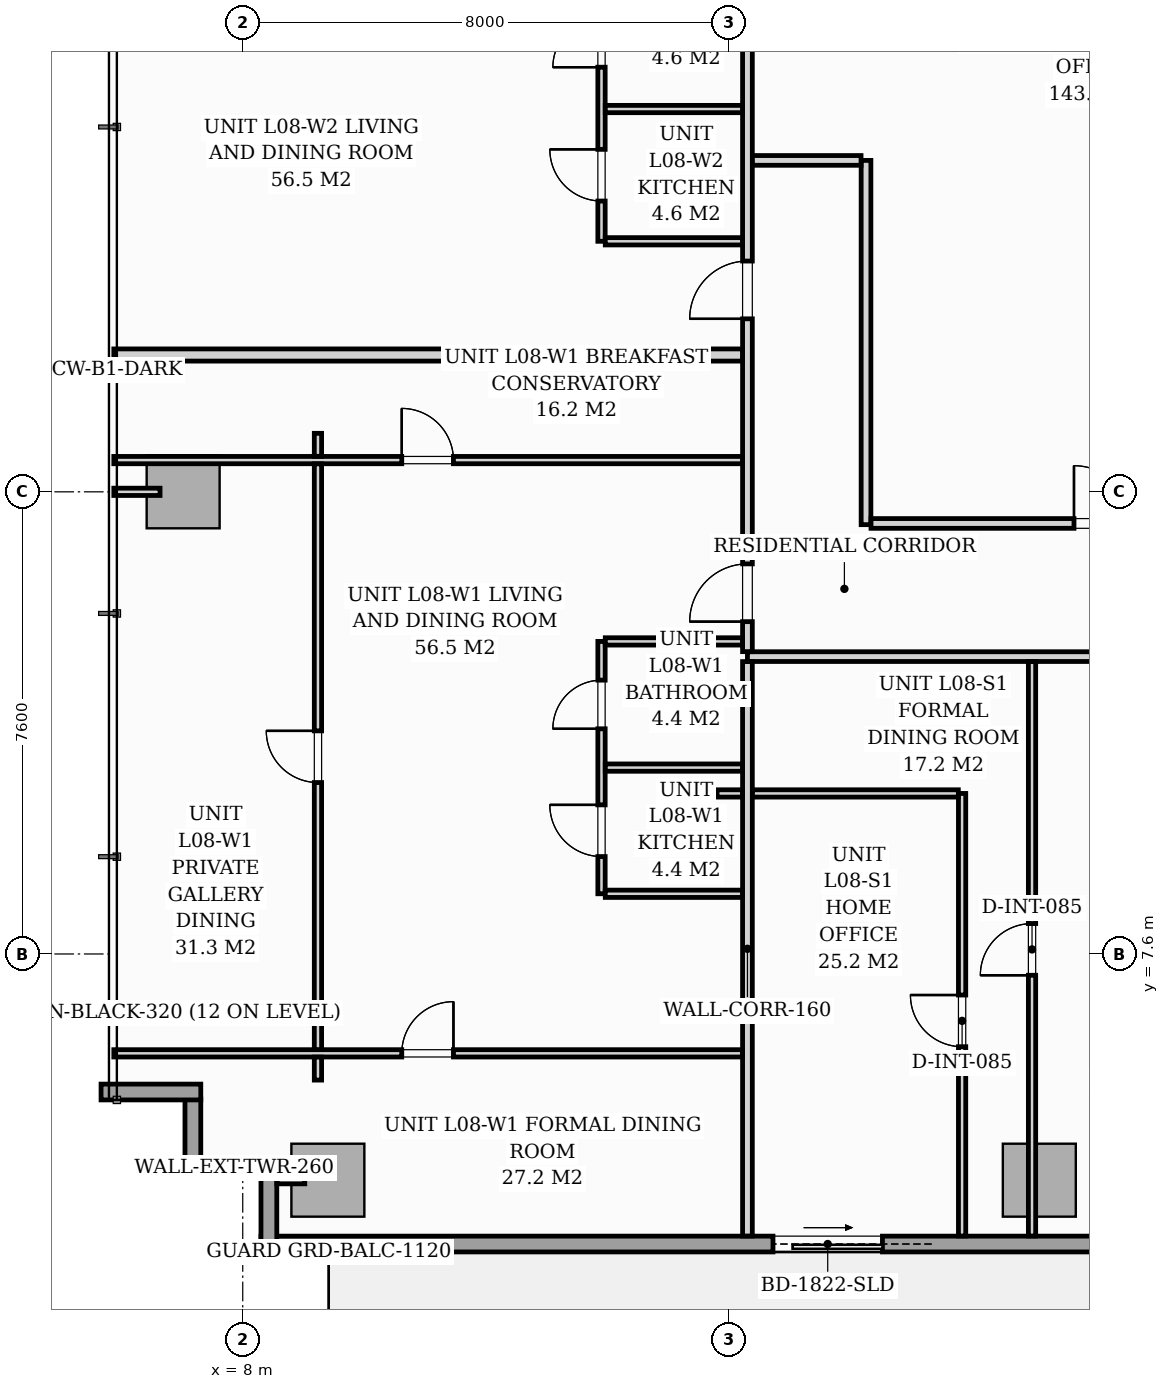
"""IFC4 building model, lengths in metres.
Left out: names, types, materials, properties, quantities, classifications, styles, units other than length and angle.
Written with IfcOpenShell. Run it as: python <this file> out.ifc"""

import sys

from ifc_helpers import new_model, si_unit, direction, frame, frame_2d, origin, origin_2d, place, context, subcontext, project, spatial, rectangle, extrude, source, transform, mapped, element, fill, save


model = new_model("IFC4")
c1 = context("Model", 3, precision=1e-05, world=origin(), true_north=direction((0.0, 1.0)))
c2 = subcontext(c1, "Body", "Model", "MODEL_VIEW")
j1 = project(units=[si_unit("LENGTHUNIT", "METRE"), si_unit("PLANEANGLEUNIT", "RADIAN")], contexts=[c1])
p1 = place(None, origin())
s1 = spatial("IfcSite", under=j1, at=p1, CompositionType="ELEMENT")
p2 = place(p1, origin())
s2 = spatial("IfcBuilding", under=s1, at=p2, CompositionType="ELEMENT")
p3 = place(p2, frame((0.0, 0.0, 32.6)))
s3 = spatial("IfcBuildingStorey", under=s2, at=p3, CompositionType="ELEMENT", Elevation=32.6)
m1 = source(origin(), c2, "Body", "SweptSolid", [
    extrude(rectangle(XDim=1.2, YDim=1.2, at=origin_2d()), origin(), (0.0, 0.0, 1.0), 3.196),
])
for number, where, z_axis, x_axis in (
    (1, (9.4, 3.88, 0.002), (0.0, 0.0, 1.0), (1.0, 0.0, 0.0)),
    (2, (21.1, 3.88, 0.002), (0.0, 0.0, 1.0), (1.0, 0.0, 0.0)),
    (3, (7.02, 15.2, 0.002), (0.0, 0.0, 1.0), (1.0, 0.0, 0.0)),
):
    element("IfcColumn", number, at=place(p3, frame(where, z_axis=z_axis, x_axis=x_axis)), inside=s3, PredefinedType="COLUMN", context=c2, shape_type="MappedRepresentation", body=[
        mapped(m1, transform((0.0, 0.0, 0.0), scale=1.0)),
    ])
p4 = place(p3, frame((8.798, 4.08, 0.0), z_axis=(0.0, 0.0, 1.0), x_axis=(-1.0, 0.0, 0.0)))
e4 = element("IfcWall", 4, at=p4, inside=s3, PredefinedType="STANDARD", context=c2, shape_type="SweptSolid", body=[
    extrude(rectangle(XDim=1.878, YDim=0.26, at=frame_2d((0.939, 0.0))), origin(), (0.0, 0.0, 1.0), 2.94),
])
p5 = place(p3, frame((7.18, 4.065, 0.0), z_axis=(0.0, 0.0, 1.0), x_axis=(0.0, 1.0, 0.0)))
e5 = element("IfcWall", 5, at=p5, inside=s3, PredefinedType="STANDARD", context=c2, shape_type="SweptSolid", body=[
    extrude(rectangle(XDim=1.15, YDim=0.26, at=frame_2d((0.575, 0.0))), origin(), (0.0, 0.0, 1.0), 2.94),
])
p6 = place(p3, frame((7.31, 5.33, 0.0), z_axis=(0.0, 0.0, 1.0), x_axis=(-1.0, 0.0, 0.0)))
e6 = element("IfcWall", 6, at=p6, inside=s3, PredefinedType="STANDARD", context=c2, shape_type="SweptSolid", body=[
    extrude(rectangle(XDim=1.64, YDim=0.26, at=frame_2d((0.82, 0.0))), origin(), (0.0, 0.0, 1.0), 2.94),
])
p7 = place(p3, frame((25.45, 2.83, 0.0), z_axis=(0.0, 0.0, 1.0), x_axis=(-1.0, 0.0, 0.0)))
e7 = element("IfcWall", 7, at=p7, inside=s3, PredefinedType="STANDARD", context=c2, shape_type="SweptSolid", body=[
    extrude(rectangle(XDim=17.15, YDim=0.26, at=frame_2d((8.575, 0.0))), origin(), (0.0, 0.0, 1.0), 2.94),
])
p8 = place(p7, frame((6.93, 0.0, 0.0)))
e8 = element("IfcOpeningElement", 8, at=p8, cuts=e7, PredefinedType="OPENING", context=c2, shape_type="SweptSolid", body=[
    extrude(rectangle(XDim=1.8, YDim=2.06, at=frame_2d((0.9, 1.03))), frame((0.0, 0.14, 0.0), z_axis=(0.0, -1.0, 0.0), x_axis=(1.0, 0.0, 0.0)), (0.0, 0.0, 1.0), 0.28),
])
p9 = place(p7, frame((0.7, 0.0, 0.65)))
e9 = element("IfcOpeningElement", 9, at=p9, cuts=e7, PredefinedType="OPENING", context=c2, shape_type="SweptSolid", body=[
    extrude(rectangle(XDim=1.6, YDim=1.5, at=frame_2d((0.8, 0.75))), frame((0.0, 0.14, 0.0), z_axis=(0.0, -1.0, 0.0), x_axis=(1.0, 0.0, 0.0)), (0.0, 0.0, 1.0), 0.28),
])
p10 = place(p3, frame((8.43, 2.815, 0.0), z_axis=(0.0, 0.0, 1.0), x_axis=(0.0, 1.0, 0.0)))
e10 = element("IfcWall", 10, at=p10, inside=s3, PredefinedType="STANDARD", context=c2, shape_type="SweptSolid", body=[
    extrude(rectangle(XDim=1.395, YDim=0.26, at=frame_2d((0.698, 0.0))), origin(), (0.0, 0.0, 1.0), 2.94),
])
p11 = place(p3, frame((16.3, 12.49, 0.0), z_axis=(0.0, 0.0, 1.0), x_axis=(1.0, 0.0, 0.0)))
e11 = element("IfcWall", 11, at=p11, inside=s3, PredefinedType="PARTITIONING", context=c2, shape_type="SweptSolid", body=[
    extrude(rectangle(XDim=35.2, YDim=0.16, at=frame_2d((17.6, 0.0))), origin(), (0.0, 0.0, 1.0), 2.94),
])
p12 = place(p11, frame((11.072, 0.0, 0.0)))
e12 = element("IfcOpeningElement", 12, at=p12, cuts=e11, PredefinedType="OPENING", context=c2, shape_type="SweptSolid", body=[
    extrude(rectangle(XDim=0.95, YDim=2.06, at=frame_2d((0.475, 1.03))), frame((0.0, 0.09, 0.0), z_axis=(0.0, -1.0, 0.0), x_axis=(1.0, 0.0, 0.0)), (0.0, 0.0, 1.0), 0.18),
])
p13 = place(p11, frame((24.032, 0.0, 0.0)))
e13 = element("IfcOpeningElement", 13, at=p13, cuts=e11, PredefinedType="OPENING", context=c2, shape_type="SweptSolid", body=[
    extrude(rectangle(XDim=0.95, YDim=2.06, at=frame_2d((0.475, 1.03))), frame((0.0, 0.09, 0.0), z_axis=(0.0, -1.0, 0.0), x_axis=(1.0, 0.0, 0.0)), (0.0, 0.0, 1.0), 0.18),
])
p14 = place(p3, frame((16.3, 2.962, 0.0), z_axis=(0.0, 0.0, 1.0), x_axis=(0.0, 1.0, 0.0)))
e14 = element("IfcWall", 14, at=p14, inside=s3, PredefinedType="PARTITIONING", context=c2, shape_type="SweptSolid", body=[
    extrude(rectangle(XDim=9.446, YDim=0.16, at=frame_2d((4.723, 0.0))), origin(), (0.0, 0.0, 1.0), 2.94),
])
p15 = place(p3, frame((16.3, 12.572, 0.0), z_axis=(0.0, 0.0, 1.0), x_axis=(0.0, 1.0, 0.0)))
e15 = element("IfcWall", 15, at=p15, inside=s3, PredefinedType="PARTITIONING", context=c2, shape_type="SweptSolid", body=[
    extrude(rectangle(XDim=14.866, YDim=0.16, at=frame_2d((7.433, 0.0))), origin(), (0.0, 0.0, 1.0), 2.94),
])
p16 = place(p15, frame((0.493, 0.0, 0.0)))
e16 = element("IfcOpeningElement", 16, at=p16, cuts=e15, PredefinedType="OPENING", context=c2, shape_type="SweptSolid", body=[
    extrude(rectangle(XDim=0.95, YDim=2.06, at=frame_2d((0.475, 1.03))), frame((0.0, 0.09, 0.0), z_axis=(0.0, -1.0, 0.0), x_axis=(1.0, 0.0, 0.0)), (0.0, 0.0, 1.0), 0.18),
])
p17 = place(p15, frame((5.473, 0.0, 0.0)))
e17 = element("IfcOpeningElement", 17, at=p17, cuts=e15, PredefinedType="OPENING", context=c2, shape_type="SweptSolid", body=[
    extrude(rectangle(XDim=0.95, YDim=2.06, at=frame_2d((0.475, 1.03))), frame((0.0, 0.09, 0.0), z_axis=(0.0, -1.0, 0.0), x_axis=(1.0, 0.0, 0.0)), (0.0, 0.0, 1.0), 0.18),
])
p18 = place(p3, frame((19.83, 2.962, 0.0), z_axis=(0.0, 0.0, 1.0), x_axis=(0.0, 1.0, 0.0)))
e18 = element("IfcWall", 18, at=p18, inside=s3, PredefinedType="PARTITIONING", context=c2, shape_type="SweptSolid", body=[
    extrude(rectangle(XDim=7.278, YDim=0.12, at=frame_2d((3.639, 0.0))), origin(), (0.0, 0.0, 1.0), 2.94),
])
p19 = place(p18, frame((3.113, 0.0, 0.0)))
e19 = element("IfcOpeningElement", 19, at=p19, cuts=e18, PredefinedType="OPENING", context=c2, shape_type="SweptSolid", body=[
    extrude(rectangle(XDim=0.85, YDim=2.05, at=frame_2d((0.425, 1.025))), frame((0.0, 0.07, 0.0), z_axis=(0.0, -1.0, 0.0), x_axis=(1.0, 0.0, 0.0)), (0.0, 0.0, 1.0), 0.14),
])
p20 = place(p3, frame((15.8, 10.24, 0.0), z_axis=(0.0, 0.0, 1.0), x_axis=(1.0, 0.0, 0.0)))
e20 = element("IfcWall", 20, at=p20, inside=s3, PredefinedType="PARTITIONING", context=c2, shape_type="SweptSolid", body=[
    extrude(rectangle(XDim=0.418, YDim=0.12, at=frame_2d((0.209, 0.0))), origin(), (0.0, 0.0, 1.0), 2.94),
])
p21 = place(p3, frame((16.382, 10.24, 0.0), z_axis=(0.0, 0.0, 1.0), x_axis=(1.0, 0.0, 0.0)))
e21 = element("IfcWall", 21, at=p21, inside=s3, PredefinedType="PARTITIONING", context=c2, shape_type="SweptSolid", body=[
    extrude(rectangle(XDim=3.386, YDim=0.12, at=frame_2d((1.693, 0.0))), origin(), (0.0, 0.0, 1.0), 2.94),
])
p22 = place(p3, frame((20.98, 2.962, 0.0), z_axis=(0.0, 0.0, 1.0), x_axis=(0.0, 1.0, 0.0)))
e22 = element("IfcWall", 22, at=p22, inside=s3, PredefinedType="PARTITIONING", context=c2, shape_type="SweptSolid", body=[
    extrude(rectangle(XDim=9.446, YDim=0.12, at=frame_2d((4.723, 0.0))), origin(), (0.0, 0.0, 1.0), 2.94),
])
p23 = place(p22, frame((4.288, 0.0, 0.0)))
e23 = element("IfcOpeningElement", 23, at=p23, cuts=e22, PredefinedType="OPENING", context=c2, shape_type="SweptSolid", body=[
    extrude(rectangle(XDim=0.85, YDim=2.05, at=frame_2d((0.425, 1.025))), frame((0.0, 0.07, 0.0), z_axis=(0.0, -1.0, 0.0), x_axis=(1.0, 0.0, 0.0)), (0.0, 0.0, 1.0), 0.14),
])
p24 = place(p3, frame((5.88, 17.45, 0.0), z_axis=(0.0, 0.0, 1.0), x_axis=(1.0, 0.0, 0.0)))
e24 = element("IfcWall", 24, at=p24, inside=s3, PredefinedType="PARTITIONING", context=c2, shape_type="SweptSolid", body=[
    extrude(rectangle(XDim=10.338, YDim=0.2, at=frame_2d((5.169, 0.0))), origin(), (0.0, 0.0, 1.0), 2.94),
])
p25 = place(p3, frame((13.9, 8.59, 0.0), z_axis=(0.0, 0.0, 1.0), x_axis=(0.0, 1.0, 0.0)))
e25 = element("IfcWall", 25, at=p25, inside=s3, PredefinedType="PARTITIONING", context=c2, shape_type="SweptSolid", body=[
    extrude(rectangle(XDim=4.15, YDim=0.12, at=frame_2d((2.075, 0.0))), origin(), (0.0, 0.0, 1.0), 2.94),
])
p26 = place(p25, frame((0.612, 0.0, 0.0)))
e26 = element("IfcOpeningElement", 26, at=p26, cuts=e25, PredefinedType="OPENING", context=c2, shape_type="SweptSolid", body=[
    extrude(rectangle(XDim=0.85, YDim=2.05, at=frame_2d((0.425, 1.025))), frame((0.0, 0.07, 0.0), z_axis=(0.0, -1.0, 0.0), x_axis=(1.0, 0.0, 0.0)), (0.0, 0.0, 1.0), 0.14),
])
p27 = place(p25, frame((2.713, 0.0, 0.0)))
e27 = element("IfcOpeningElement", 27, at=p27, cuts=e25, PredefinedType="OPENING", context=c2, shape_type="SweptSolid", body=[
    extrude(rectangle(XDim=0.8, YDim=2.02, at=frame_2d((0.4, 1.01))), frame((0.0, 0.07, 0.0), z_axis=(0.0, -1.0, 0.0), x_axis=(1.0, 0.0, 0.0)), (0.0, 0.0, 1.0), 0.14),
])
for number, where, z_axis, x_axis in (
    (28, (13.962, 10.665, 0.0), (0.0, 0.0, 1.0), (1.0, 0.0, 0.0)),
    (29, (13.962, 8.59, 0.0), (0.0, 0.0, 1.0), (1.0, 0.0, 0.0)),
    (30, (13.962, 12.74, 0.0), (0.0, 0.0, 1.0), (1.0, 0.0, 0.0)),
):
    element("IfcWall", number, at=place(p3, frame(where, z_axis=z_axis, x_axis=x_axis)), inside=s3, PredefinedType="PARTITIONING", context=c2, shape_type="SweptSolid", body=[
        extrude(rectangle(XDim=2.256, YDim=0.12, at=frame_2d((1.128, 0.0))), origin(), (0.0, 0.0, 1.0), 2.94),
    ])
p28 = place(p3, frame((5.88, 5.966, 0.0), z_axis=(0.0, 0.0, 1.0), x_axis=(1.0, 0.0, 0.0)))
e31 = element("IfcWall", 31, at=p28, inside=s3, PredefinedType="PARTITIONING", context=c2, shape_type="SweptSolid", body=[
    extrude(rectangle(XDim=10.338, YDim=0.12, at=frame_2d((5.169, 0.0))), origin(), (0.0, 0.0, 1.0), 2.94),
])
p29 = place(p28, frame((4.735, 0.0, 0.0)))
e32 = element("IfcOpeningElement", 32, at=p29, cuts=e31, PredefinedType="OPENING", context=c2, shape_type="SweptSolid", body=[
    extrude(rectangle(XDim=0.85, YDim=2.05, at=frame_2d((0.425, 1.025))), frame((0.0, 0.07, 0.0), z_axis=(0.0, -1.0, 0.0), x_axis=(1.0, 0.0, 0.0)), (0.0, 0.0, 1.0), 0.14),
])
p30 = place(p3, frame((5.88, 15.722, 0.0), z_axis=(0.0, 0.0, 1.0), x_axis=(1.0, 0.0, 0.0)))
e33 = element("IfcWall", 33, at=p30, inside=s3, PredefinedType="PARTITIONING", context=c2, shape_type="SweptSolid", body=[
    extrude(rectangle(XDim=10.338, YDim=0.12, at=frame_2d((5.169, 0.0))), origin(), (0.0, 0.0, 1.0), 2.045),
])
p31 = place(p30, frame((4.735, 0.0, 0.0)))
e34 = element("IfcOpeningElement", 34, at=p31, cuts=e33, PredefinedType="OPENING", context=c2, shape_type="SweptSolid", body=[
    extrude(rectangle(XDim=0.85, YDim=2.01, at=frame_2d((0.425, 1.005))), frame((0.0, 0.07, 0.0), z_axis=(0.0, -1.0, 0.0), x_axis=(1.0, 0.0, 0.0)), (0.0, 0.0, 1.0), 0.14),
])
p32 = place(p3, frame((9.237, 5.526, 0.0), z_axis=(0.0, 0.0, 1.0), x_axis=(0.0, 1.0, 0.0)))
e35 = element("IfcWall", 35, at=p32, inside=s3, PredefinedType="PARTITIONING", context=c2, shape_type="SweptSolid", body=[
    extrude(rectangle(XDim=0.378, YDim=0.12, at=frame_2d((0.189, 0.0))), origin(), (0.0, 0.0, 1.0), 2.94),
])
p33 = place(p3, frame((9.237, 6.028, 0.0), z_axis=(0.0, 0.0, 1.0), x_axis=(0.0, 1.0, 0.0)))
e36 = element("IfcWall", 36, at=p33, inside=s3, PredefinedType="PARTITIONING", context=c2, shape_type="SweptSolid", body=[
    extrude(rectangle(XDim=9.632, YDim=0.12, at=frame_2d((4.816, 0.0))), origin(), (0.0, 0.0, 1.0), 2.94),
])
p34 = place(p33, frame((4.391, 0.0, 0.0)))
e37 = element("IfcOpeningElement", 37, at=p34, cuts=e36, PredefinedType="OPENING", context=c2, shape_type="SweptSolid", body=[
    extrude(rectangle(XDim=0.85, YDim=2.05, at=frame_2d((0.425, 1.025))), frame((0.0, 0.07, 0.0), z_axis=(0.0, -1.0, 0.0), x_axis=(1.0, 0.0, 0.0)), (0.0, 0.0, 1.0), 0.14),
])
p35 = place(p3, frame((9.237, 15.784, 0.0), z_axis=(0.0, 0.0, 1.0), x_axis=(0.0, 1.0, 0.0)))
e38 = element("IfcWall", 38, at=p35, inside=s3, PredefinedType="PARTITIONING", context=c2, shape_type="SweptSolid", body=[
    extrude(rectangle(XDim=0.378, YDim=0.12, at=frame_2d((0.189, 0.0))), origin(), (0.0, 0.0, 1.0), 2.94),
])
p36 = place(p3, frame((13.9, 19.32, 0.0), z_axis=(0.0, 0.0, 1.0), x_axis=(0.0, 1.0, 0.0)))
e39 = element("IfcWall", 39, at=p36, inside=s3, PredefinedType="PARTITIONING", context=c2, shape_type="SweptSolid", body=[
    extrude(rectangle(XDim=4.35, YDim=0.12, at=frame_2d((2.175, 0.0))), origin(), (0.0, 0.0, 1.0), 2.94),
])
p37 = place(p36, frame((0.662, 0.0, 0.0)))
e40 = element("IfcOpeningElement", 40, at=p37, cuts=e39, PredefinedType="OPENING", context=c2, shape_type="SweptSolid", body=[
    extrude(rectangle(XDim=0.85, YDim=2.05, at=frame_2d((0.425, 1.025))), frame((0.0, 0.07, 0.0), z_axis=(0.0, -1.0, 0.0), x_axis=(1.0, 0.0, 0.0)), (0.0, 0.0, 1.0), 0.14),
])
p38 = place(p36, frame((2.863, 0.0, 0.0)))
e41 = element("IfcOpeningElement", 41, at=p38, cuts=e39, PredefinedType="OPENING", context=c2, shape_type="SweptSolid", body=[
    extrude(rectangle(XDim=0.8, YDim=2.02, at=frame_2d((0.4, 1.01))), frame((0.0, 0.07, 0.0), z_axis=(0.0, -1.0, 0.0), x_axis=(1.0, 0.0, 0.0)), (0.0, 0.0, 1.0), 0.14),
])
for number, where, z_axis, x_axis in (
    (42, (13.962, 21.495, 0.0), (0.0, 0.0, 1.0), (1.0, 0.0, 0.0)),
    (43, (13.962, 19.32, 0.0), (0.0, 0.0, 1.0), (1.0, 0.0, 0.0)),
):
    element("IfcWall", number, at=place(p3, frame(where, z_axis=z_axis, x_axis=x_axis)), inside=s3, PredefinedType="PARTITIONING", context=c2, shape_type="SweptSolid", body=[
        extrude(rectangle(XDim=2.256, YDim=0.12, at=frame_2d((1.128, 0.0))), origin(), (0.0, 0.0, 1.0), 2.94),
    ])
p39 = place(p3, frame((18.25, 14.66, 0.0), z_axis=(0.0, 0.0, 1.0), x_axis=(0.0, 1.0, 0.0)))
e44 = element("IfcWall", 44, at=p39, inside=s3, PredefinedType="PARTITIONING", context=c2, shape_type="SweptSolid", body=[
    extrude(rectangle(XDim=5.99, YDim=0.16, at=frame_2d((2.995, 0.0))), origin(), (0.0, 0.0, 1.0), 2.94),
])
p40 = place(p3, frame((16.382, 20.65, 0.0), z_axis=(0.0, 0.0, 1.0), x_axis=(1.0, 0.0, 0.0)))
e45 = element("IfcWall", 45, at=p40, inside=s3, PredefinedType="PARTITIONING", context=c2, shape_type="SweptSolid", body=[
    extrude(rectangle(XDim=1.786, YDim=0.16, at=frame_2d((0.893, 0.0))), origin(), (0.0, 0.0, 1.0), 2.94),
])
p41 = place(p3, frame((18.332, 14.68, 0.0), z_axis=(0.0, 0.0, 1.0), x_axis=(1.0, 0.0, 0.0)))
e46 = element("IfcWall", 46, at=p41, inside=s3, PredefinedType="PARTITIONING", context=c2, shape_type="SweptSolid", body=[
    extrude(rectangle(XDim=7.828, YDim=0.16, at=frame_2d((3.914, 0.0))), origin(), (0.0, 0.0, 1.0), 2.94),
])
p42 = place(p41, frame((3.338, 0.0, 0.0)))
e47 = element("IfcOpeningElement", 47, at=p42, cuts=e46, PredefinedType="OPENING", context=c2, shape_type="SweptSolid", body=[
    extrude(rectangle(XDim=0.95, YDim=2.06, at=frame_2d((0.475, 1.03))), frame((0.0, 0.09, 0.0), z_axis=(0.0, -1.0, 0.0), x_axis=(1.0, 0.0, 0.0)), (0.0, 0.0, 1.0), 0.18),
])
p43 = place(p3, frame((9.02, 3.88, 0.0), z_axis=(0.0, 0.0, 1.0), x_axis=(-1.0, 0.0, 0.0)))
e48 = element("IfcWall", 48, at=p43, inside=s3, PredefinedType="PARTITIONING", context=c2, shape_type="SweptSolid", body=[
    extrude(rectangle(XDim=0.458, YDim=0.12, at=frame_2d((0.229, 0.0))), origin(), (0.0, 0.0, 1.0), 2.94),
])
p44 = place(p3, frame((6.64, 15.2, 0.0), z_axis=(0.0, 0.0, 1.0), x_axis=(-1.0, 0.0, 0.0)))
e49 = element("IfcWall", 49, at=p44, inside=s3, PredefinedType="PARTITIONING", context=c2, shape_type="SweptSolid", body=[
    extrude(rectangle(XDim=0.76, YDim=0.12, at=frame_2d((0.38, 0.0))), origin(), (0.0, 0.0, 1.0), 2.94),
])
m2 = source(origin(), c2, "Body", "SweptSolid", [
    extrude(rectangle(XDim=1.8, YDim=2.06, at=frame_2d((0.9, 1.03))), frame((0.0, 0.025, 0.0), z_axis=(0.0, -1.0, 0.0), x_axis=(1.0, 0.0, 0.0)), (0.0, 0.0, 1.0), 0.05),
])
p45 = place(p8, origin())
e50 = element("IfcDoor", 50, at=p45, inside=s3, OperationType="SLIDING_TO_LEFT", PredefinedType="DOOR", context=c2, shape_type="MappedRepresentation", body=[
    mapped(m2, transform((0.0, 0.0, 0.0), scale=1.0)),
])
fill(e8, e50)
m3 = source(origin(), c2, "Body", "SweptSolid", [
    extrude(rectangle(XDim=0.85, YDim=2.05, at=frame_2d((0.425, 1.025))), frame((0.0, 0.025, 0.0), z_axis=(0.0, -1.0, 0.0), x_axis=(1.0, 0.0, 0.0)), (0.0, 0.0, 1.0), 0.05),
])
p46 = place(p19, origin())
e51 = element("IfcDoor", 51, at=p46, inside=s3, OperationType="SINGLE_SWING_RIGHT", PredefinedType="DOOR", context=c2, shape_type="MappedRepresentation", body=[
    mapped(m3, transform((0.0, 0.0, 0.0), scale=1.0)),
])
fill(e19, e51)
p47 = place(p23, origin())
e52 = element("IfcDoor", 52, at=p47, inside=s3, OperationType="SINGLE_SWING_LEFT", PredefinedType="DOOR", context=c2, shape_type="MappedRepresentation", body=[
    mapped(m3, transform((0.0, 0.0, 0.0), scale=1.0)),
])
fill(e23, e52)
m4 = source(origin(), c2, "Body", "SweptSolid", [
    extrude(rectangle(XDim=0.95, YDim=2.06, at=frame_2d((0.475, 1.03))), frame((0.0, 0.025, 0.0), z_axis=(0.0, -1.0, 0.0), x_axis=(1.0, 0.0, 0.0)), (0.0, 0.0, 1.0), 0.05),
])
p48 = place(p16, origin())
e53 = element("IfcDoor", 53, at=p48, inside=s3, OperationType="SINGLE_SWING_LEFT", PredefinedType="DOOR", context=c2, shape_type="MappedRepresentation", body=[
    mapped(m4, transform((0.0, 0.0, 0.0), scale=1.0)),
])
fill(e16, e53)
p49 = place(p26, origin())
e54 = element("IfcDoor", 54, at=p49, inside=s3, OperationType="SINGLE_SWING_RIGHT", PredefinedType="DOOR", context=c2, shape_type="MappedRepresentation", body=[
    mapped(m3, transform((0.0, 0.0, 0.0), scale=1.0)),
])
fill(e26, e54)
m5 = source(origin(), c2, "Body", "SweptSolid", [
    extrude(rectangle(XDim=0.8, YDim=2.02, at=frame_2d((0.4, 1.01))), frame((0.0, 0.025, 0.0), z_axis=(0.0, -1.0, 0.0), x_axis=(1.0, 0.0, 0.0)), (0.0, 0.0, 1.0), 0.05),
])
p50 = place(p27, origin())
e55 = element("IfcDoor", 55, at=p50, inside=s3, OperationType="SINGLE_SWING_LEFT", PredefinedType="DOOR", context=c2, shape_type="MappedRepresentation", body=[
    mapped(m5, transform((0.0, 0.0, 0.0), scale=1.0)),
])
fill(e27, e55)
p51 = place(p29, origin())
e56 = element("IfcDoor", 56, at=p51, inside=s3, OperationType="SINGLE_SWING_RIGHT", PredefinedType="DOOR", context=c2, shape_type="MappedRepresentation", body=[
    mapped(m3, transform((0.0, 0.0, 0.0), scale=1.0)),
])
fill(e32, e56)
m6 = source(origin(), c2, "Body", "SweptSolid", [
    extrude(rectangle(XDim=0.85, YDim=2.01, at=frame_2d((0.425, 1.005))), frame((0.0, 0.025, 0.0), z_axis=(0.0, -1.0, 0.0), x_axis=(1.0, 0.0, 0.0)), (0.0, 0.0, 1.0), 0.05),
])
p52 = place(p31, origin())
e57 = element("IfcDoor", 57, at=p52, inside=s3, OperationType="SINGLE_SWING_LEFT", PredefinedType="DOOR", context=c2, shape_type="MappedRepresentation", body=[
    mapped(m6, transform((0.0, 0.0, 0.0), scale=1.0)),
])
fill(e34, e57)
p53 = place(p34, origin())
e58 = element("IfcDoor", 58, at=p53, inside=s3, OperationType="SINGLE_SWING_RIGHT", PredefinedType="DOOR", context=c2, shape_type="MappedRepresentation", body=[
    mapped(m3, transform((0.0, 0.0, 0.0), scale=1.0)),
])
fill(e37, e58)
p54 = place(p17, origin())
e59 = element("IfcDoor", 59, at=p54, inside=s3, OperationType="SINGLE_SWING_LEFT", PredefinedType="DOOR", context=c2, shape_type="MappedRepresentation", body=[
    mapped(m4, transform((0.0, 0.0, 0.0), scale=1.0)),
])
fill(e17, e59)
p55 = place(p37, origin())
e60 = element("IfcDoor", 60, at=p55, inside=s3, OperationType="SINGLE_SWING_RIGHT", PredefinedType="DOOR", context=c2, shape_type="MappedRepresentation", body=[
    mapped(m3, transform((0.0, 0.0, 0.0), scale=1.0)),
])
fill(e40, e60)
p56 = place(p38, origin())
e61 = element("IfcDoor", 61, at=p56, inside=s3, OperationType="SINGLE_SWING_LEFT", PredefinedType="DOOR", context=c2, shape_type="MappedRepresentation", body=[
    mapped(m5, transform((0.0, 0.0, 0.0), scale=1.0)),
])
fill(e41, e61)
p57 = place(p42, origin())
e62 = element("IfcDoor", 62, at=p57, inside=s3, OperationType="SINGLE_SWING_LEFT", PredefinedType="DOOR", context=c2, shape_type="MappedRepresentation", body=[
    mapped(m4, transform((0.0, 0.0, 0.0), scale=1.0)),
])
fill(e47, e62)
save(model, sys.argv[1])
